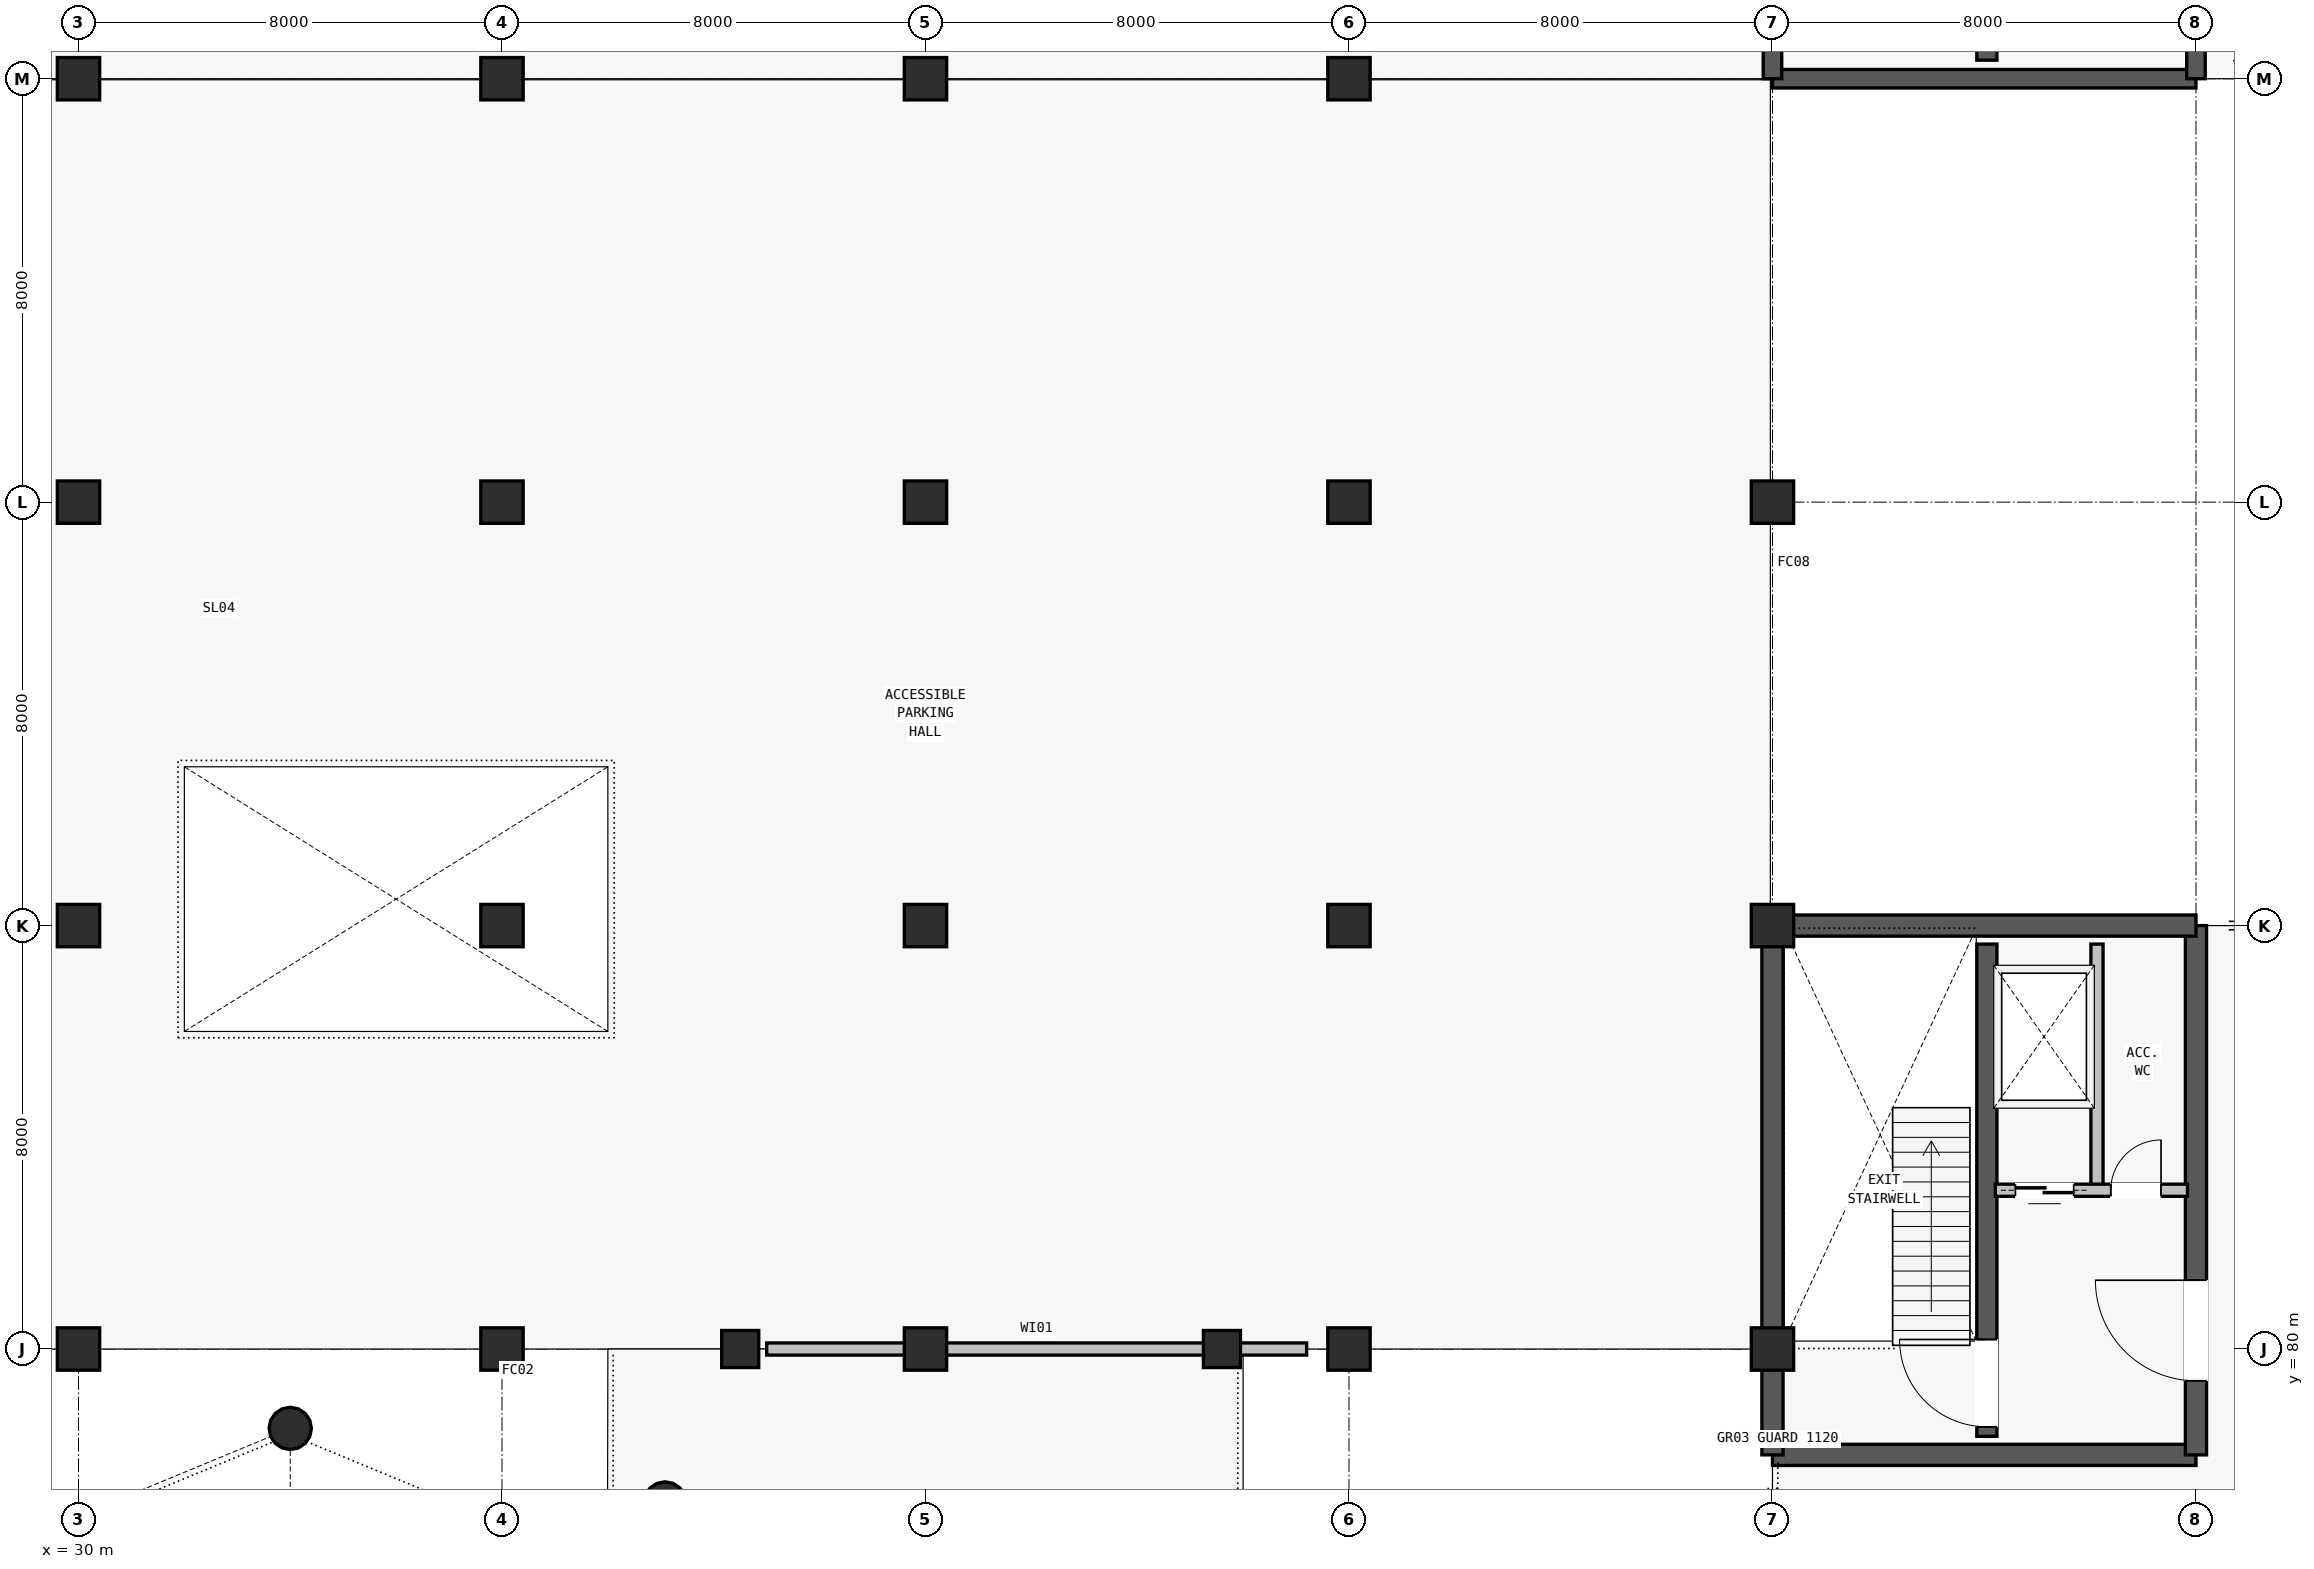
"""IFC4 building model, lengths in metres.
Left out: names, types, materials, properties, quantities, classifications, styles, units other than length and angle.
Written with IfcOpenShell. Run it as: python <this file> out.ifc"""

import sys

from ifc_helpers import new_model, si_unit, direction, frame, frame_2d, origin, origin_2d, place, context, subcontext, project, spatial, rectangle, circle, extrude, element, fill, save


model = new_model("IFC4")
c1 = context("Model", 3, precision=1e-05, world=origin(), true_north=direction((0.0, 1.0)))
c2 = subcontext(c1, "Body", "Model", "MODEL_VIEW")
j1 = project(units=[si_unit("LENGTHUNIT", "METRE"), si_unit("PLANEANGLEUNIT", "RADIAN")], contexts=[c1])
p1 = place(None, origin())
s1 = spatial("IfcSite", under=j1, at=p1, CompositionType="ELEMENT")
p2 = place(p1, origin())
s2 = spatial("IfcBuilding", under=s1, at=p2, CompositionType="ELEMENT")
p3 = place(p2, frame((0.0, 0.0, 5.6)))
s3 = spatial("IfcBuildingStorey", under=s2, at=p3, CompositionType="ELEMENT", Elevation=5.6)
for number, where, z_axis, x_axis in (
    (1, (30.0, 104.0, 0.0), (0.0, 0.0, 1.0), (1.0, 0.0, 0.0)),
    (2, (38.0, 104.0, 0.0), (0.0, 0.0, 1.0), (1.0, 0.0, 0.0)),
    (3, (46.0, 104.0, 0.0), (0.0, 0.0, 1.0), (1.0, 0.0, 0.0)),
    (4, (54.0, 104.0, 0.0), (0.0, 0.0, 1.0), (1.0, 0.0, 0.0)),
    (5, (30.0, 80.0, 0.0), (0.0, 0.0, 1.0), (1.0, 0.0, 0.0)),
    (6, (30.0, 88.0, 0.0), (0.0, 0.0, 1.0), (1.0, 0.0, 0.0)),
    (7, (30.0, 96.0, 0.0), (0.0, 0.0, 1.0), (1.0, 0.0, 0.0)),
    (8, (38.0, 80.0, 0.0), (0.0, 0.0, 1.0), (1.0, 0.0, 0.0)),
    (9, (38.0, 88.0, 0.0), (0.0, 0.0, 1.0), (1.0, 0.0, 0.0)),
    (10, (38.0, 96.0, 0.0), (0.0, 0.0, 1.0), (1.0, 0.0, 0.0)),
    (11, (46.0, 80.0, 0.0), (0.0, 0.0, 1.0), (1.0, 0.0, 0.0)),
    (12, (46.0, 88.0, 0.0), (0.0, 0.0, 1.0), (1.0, 0.0, 0.0)),
    (13, (46.0, 96.0, 0.0), (0.0, 0.0, 1.0), (1.0, 0.0, 0.0)),
    (14, (54.0, 80.0, 0.0), (0.0, 0.0, 1.0), (1.0, 0.0, 0.0)),
    (15, (54.0, 88.0, 0.0), (0.0, 0.0, 1.0), (1.0, 0.0, 0.0)),
    (16, (54.0, 96.0, 0.0), (0.0, 0.0, 1.0), (1.0, 0.0, 0.0)),
    (17, (62.0, 80.0, 0.0), (0.0, 0.0, 1.0), (1.0, 0.0, 0.0)),
    (18, (62.0, 88.0, 0.0), (0.0, 0.0, 1.0), (1.0, 0.0, 0.0)),
    (19, (62.0, 96.0, 0.0), (0.0, 0.0, 1.0), (1.0, 0.0, 0.0)),
):
    element("IfcColumn", number, at=place(p3, frame(where, z_axis=z_axis, x_axis=x_axis)), inside=s3, PredefinedType="COLUMN", context=c2, shape_type="SweptSolid", body=[
        extrude(rectangle(XDim=0.8, YDim=0.8, at=origin_2d()), origin(), (0.0, 0.0, 1.0), 3.9),
    ])
for number, where, z_axis, x_axis in (
    (20, (41.08, 77.092, 0.0), (0.0, 0.0, 1.0), (1.0, 0.0, 0.0)),
    (21, (34.0, 78.5, 0.0), (0.0, 0.0, 1.0), (1.0, 0.0, 0.0)),
):
    element("IfcColumn", number, at=place(p3, frame(where, z_axis=z_axis, x_axis=x_axis)), inside=s3, PredefinedType="COLUMN", context=c2, shape_type="SweptSolid", body=[
        extrude(circle(Radius=0.4, at=origin_2d()), origin(), (0.0, 0.0, 1.0), 3.9),
    ])
for number, where, z_axis, x_axis in (
    (22, (51.6, 80.0, 0.0), (0.0, 0.0, 1.0), (1.0, 0.0, 0.0)),
    (23, (42.5, 80.0, 0.0), (0.0, 0.0, 1.0), (1.0, 0.0, 0.0)),
):
    element("IfcColumn", number, at=place(p3, frame(where, z_axis=z_axis, x_axis=x_axis)), inside=s3, PredefinedType="COLUMN", context=c2, shape_type="SweptSolid", body=[
        extrude(rectangle(XDim=0.7, YDim=0.7, at=origin_2d()), origin(), (0.0, 0.0, 1.0), 3.9),
    ])
p4 = place(p3, frame((62.0, 78.0, 0.0), z_axis=(0.0, 0.0, 1.0), x_axis=(1.0, 0.0, 0.0)))
e24 = element("IfcWall", 24, at=p4, inside=s3, PredefinedType="SHEAR", context=c2, shape_type="SweptSolid", body=[
    extrude(rectangle(XDim=8.0, YDim=0.4, at=frame_2d((4.0, 0.0))), origin(), (0.0, 0.0, 1.0), 2.4),
])
p5 = place(p3, frame((70.0, 78.0, 0.0), z_axis=(0.0, 0.0, 1.0), x_axis=(0.0, 1.0, 0.0)))
e25 = element("IfcWall", 25, at=p5, inside=s3, PredefinedType="SHEAR", context=c2, shape_type="SweptSolid", body=[
    extrude(rectangle(XDim=10.0, YDim=0.4, at=frame_2d((5.0, 0.0))), origin(), (0.0, 0.0, 1.0), 2.4),
])
p6 = place(p5, frame((1.4, 0.0, 0.0)))
e26 = element("IfcOpeningElement", 26, at=p6, cuts=e25, PredefinedType="OPENING", context=c2, shape_type="SweptSolid", body=[
    extrude(rectangle(XDim=1.9, YDim=2.3, at=frame_2d((0.95, 1.15))), frame((0.0, 0.21, 0.0), z_axis=(0.0, -1.0, 0.0), x_axis=(1.0, 0.0, 0.0)), (0.0, 0.0, 1.0), 0.42),
])
p7 = place(p3, frame((70.0, 88.0, 0.0), z_axis=(0.0, 0.0, 1.0), x_axis=(-1.0, 0.0, 0.0)))
e27 = element("IfcWall", 27, at=p7, inside=s3, PredefinedType="SHEAR", context=c2, shape_type="SweptSolid", body=[
    extrude(rectangle(XDim=8.0, YDim=0.4, at=frame_2d((4.0, 0.0))), origin(), (0.0, 0.0, 1.0), 2.4),
])
p8 = place(p3, frame((62.0, 88.0, 0.0), z_axis=(0.0, 0.0, 1.0), x_axis=(0.0, -1.0, 0.0)))
e28 = element("IfcWall", 28, at=p8, inside=s3, PredefinedType="SHEAR", context=c2, shape_type="SweptSolid", body=[
    extrude(rectangle(XDim=10.0, YDim=0.4, at=frame_2d((5.0, 0.0))), origin(), (0.0, 0.0, 1.0), 2.4),
])
p9 = place(p3, frame((66.05, 78.35, 0.0), z_axis=(0.0, 0.0, 1.0), x_axis=(0.0, 1.0, 0.0)))
e29 = element("IfcWall", 29, at=p9, inside=s3, PredefinedType="SHEAR", context=c2, shape_type="SweptSolid", body=[
    extrude(rectangle(XDim=9.3, YDim=0.38, at=frame_2d((4.65, 0.0))), origin(), (0.0, 0.0, 1.0), 2.4),
])
p10 = place(p9, frame((0.18, 0.0, 0.0)))
e30 = element("IfcOpeningElement", 30, at=p10, cuts=e29, PredefinedType="OPENING", context=c2, shape_type="SweptSolid", body=[
    extrude(rectangle(XDim=1.65, YDim=2.2, at=frame_2d((0.825, 1.1))), frame((0.0, 0.2, 0.0), z_axis=(0.0, -1.0, 0.0), x_axis=(1.0, 0.0, 0.0)), (0.0, 0.0, 1.0), 0.4),
])
p11 = place(p3, frame((68.13, 83.0, 0.0), z_axis=(0.0, 0.0, 1.0), x_axis=(0.0, 1.0, 0.0)))
e31 = element("IfcWall", 31, at=p11, inside=s3, PredefinedType="PARTITIONING", context=c2, shape_type="SweptSolid", body=[
    extrude(rectangle(XDim=4.65, YDim=0.23, at=frame_2d((2.325, 0.0))), origin(), (0.0, 0.0, 1.0), 2.4),
])
p12 = place(p3, frame((66.21, 83.0, 0.0), z_axis=(0.0, 0.0, 1.0), x_axis=(1.0, 0.0, 0.0)))
e32 = element("IfcWall", 32, at=p12, inside=s3, PredefinedType="PARTITIONING", context=c2, shape_type="SweptSolid", body=[
    extrude(rectangle(XDim=3.63, YDim=0.23, at=frame_2d((1.815, 0.0))), origin(), (0.0, 0.0, 1.0), 2.4),
])
p13 = place(p12, frame((0.38, 0.0, 0.0)))
e33 = element("IfcOpeningElement", 33, at=p13, cuts=e32, PredefinedType="OPENING", context=c2, shape_type="SweptSolid", body=[
    extrude(rectangle(XDim=1.1, YDim=2.15, at=frame_2d((0.55, 1.075))), frame((0.0, 0.125, 0.0), z_axis=(0.0, -1.0, 0.0), x_axis=(1.0, 0.0, 0.0)), (0.0, 0.0, 1.0), 0.25),
])
p14 = place(p12, frame((2.18, 0.0, 0.0)))
e34 = element("IfcOpeningElement", 34, at=p14, cuts=e32, PredefinedType="OPENING", context=c2, shape_type="SweptSolid", body=[
    extrude(rectangle(XDim=0.95, YDim=2.1, at=frame_2d((0.475, 1.05))), frame((0.0, 0.125, 0.0), z_axis=(0.0, -1.0, 0.0), x_axis=(1.0, 0.0, 0.0)), (0.0, 0.0, 1.0), 0.25),
])
p15 = place(p3, frame((62.0, 104.0, 0.0), z_axis=(0.0, 0.0, 1.0), x_axis=(1.0, 0.0, 0.0)))
e35 = element("IfcWall", 35, at=p15, inside=s3, PredefinedType="SHEAR", context=c2, shape_type="SweptSolid", body=[
    extrude(rectangle(XDim=8.0, YDim=0.35, at=frame_2d((4.0, 0.0))), origin(), (0.0, 0.0, 1.0), 3.62),
])
p16 = place(p3, frame((70.0, 104.0, 0.0), z_axis=(0.0, 0.0, 1.0), x_axis=(0.0, 1.0, 0.0)))
e36 = element("IfcWall", 36, at=p16, inside=s3, PredefinedType="SHEAR", context=c2, shape_type="SweptSolid", body=[
    extrude(rectangle(XDim=9.0, YDim=0.35, at=frame_2d((4.5, 0.0))), origin(), (0.0, 0.0, 1.0), 3.62),
])
p17 = place(p16, frame((1.4, 0.0, 0.0)))
e37 = element("IfcOpeningElement", 37, at=p17, cuts=e36, PredefinedType="OPENING", context=c2, shape_type="SweptSolid", body=[
    extrude(rectangle(XDim=1.9, YDim=2.3, at=frame_2d((0.95, 1.15))), frame((0.0, 0.185, 0.0), z_axis=(0.0, -1.0, 0.0), x_axis=(1.0, 0.0, 0.0)), (0.0, 0.0, 1.0), 0.37),
])
p18 = place(p3, frame((62.0, 113.0, 0.0), z_axis=(0.0, 0.0, 1.0), x_axis=(0.0, -1.0, 0.0)))
e38 = element("IfcWall", 38, at=p18, inside=s3, PredefinedType="SHEAR", context=c2, shape_type="SweptSolid", body=[
    extrude(rectangle(XDim=9.0, YDim=0.35, at=frame_2d((4.5, 0.0))), origin(), (0.0, 0.0, 1.0), 3.62),
])
p19 = place(p3, frame((66.05, 104.35, 0.0), z_axis=(0.0, 0.0, 1.0), x_axis=(0.0, 1.0, 0.0)))
e39 = element("IfcWall", 39, at=p19, inside=s3, PredefinedType="SHEAR", context=c2, shape_type="SweptSolid", body=[
    extrude(rectangle(XDim=8.3, YDim=0.38, at=frame_2d((4.15, 0.0))), origin(), (0.0, 0.0, 1.0), 3.62),
])
p20 = place(p19, frame((0.18, 0.0, 0.0)))
e40 = element("IfcOpeningElement", 40, at=p20, cuts=e39, PredefinedType="OPENING", context=c2, shape_type="SweptSolid", body=[
    extrude(rectangle(XDim=1.65, YDim=2.2, at=frame_2d((0.825, 1.1))), frame((0.0, 0.2, 0.0), z_axis=(0.0, -1.0, 0.0), x_axis=(1.0, 0.0, 0.0)), (0.0, 0.0, 1.0), 0.4),
])
p21 = place(p3, frame((43.0, 80.0, 0.0), z_axis=(0.0, 0.0, 1.0), x_axis=(1.0, 0.0, 0.0)))
e41 = element("IfcWall", 41, at=p21, inside=s3, PredefinedType="PARTITIONING", context=c2, shape_type="SweptSolid", body=[
    extrude(rectangle(XDim=10.2, YDim=0.23, at=frame_2d((5.1, 0.0))), origin(), (0.0, 0.0, 1.0), 2.48),
])
p22 = place(p6, origin())
e42 = element("IfcDoor", 42, at=p22, inside=s3, OperationType="SINGLE_SWING_RIGHT", PredefinedType="DOOR", context=c2, shape_type="SweptSolid", body=[
    extrude(rectangle(XDim=1.9, YDim=2.3, at=frame_2d((0.95, 1.15))), frame((0.0, 0.025, 0.0), z_axis=(0.0, -1.0, 0.0), x_axis=(1.0, 0.0, 0.0)), (0.0, 0.0, 1.0), 0.05),
])
fill(e26, e42)
p23 = place(p10, origin())
e43 = element("IfcDoor", 43, at=p23, inside=s3, OperationType="SINGLE_SWING_RIGHT", PredefinedType="DOOR", context=c2, shape_type="SweptSolid", body=[
    extrude(rectangle(XDim=1.65, YDim=2.2, at=frame_2d((0.825, 1.1))), frame((0.0, 0.025, 0.0), z_axis=(0.0, -1.0, 0.0), x_axis=(1.0, 0.0, 0.0)), (0.0, 0.0, 1.0), 0.05),
])
fill(e30, e43)
p24 = place(p13, origin())
e44 = element("IfcDoor", 44, at=p24, inside=s3, OperationType="SLIDING_TO_LEFT", PredefinedType="DOOR", context=c2, shape_type="SweptSolid", body=[
    extrude(rectangle(XDim=1.1, YDim=2.15, at=frame_2d((0.55, 1.075))), frame((0.0, 0.025, 0.0), z_axis=(0.0, -1.0, 0.0), x_axis=(1.0, 0.0, 0.0)), (0.0, 0.0, 1.0), 0.05),
])
fill(e33, e44)
p25 = place(p14, origin())
e45 = element("IfcDoor", 45, at=p25, inside=s3, OperationType="SINGLE_SWING_RIGHT", PredefinedType="DOOR", context=c2, shape_type="SweptSolid", body=[
    extrude(rectangle(XDim=0.95, YDim=2.1, at=frame_2d((0.475, 1.05))), frame((0.0, 0.025, 0.0), z_axis=(0.0, -1.0, 0.0), x_axis=(1.0, 0.0, 0.0)), (0.0, 0.0, 1.0), 0.05),
])
fill(e34, e45)
save(model, sys.argv[1])
